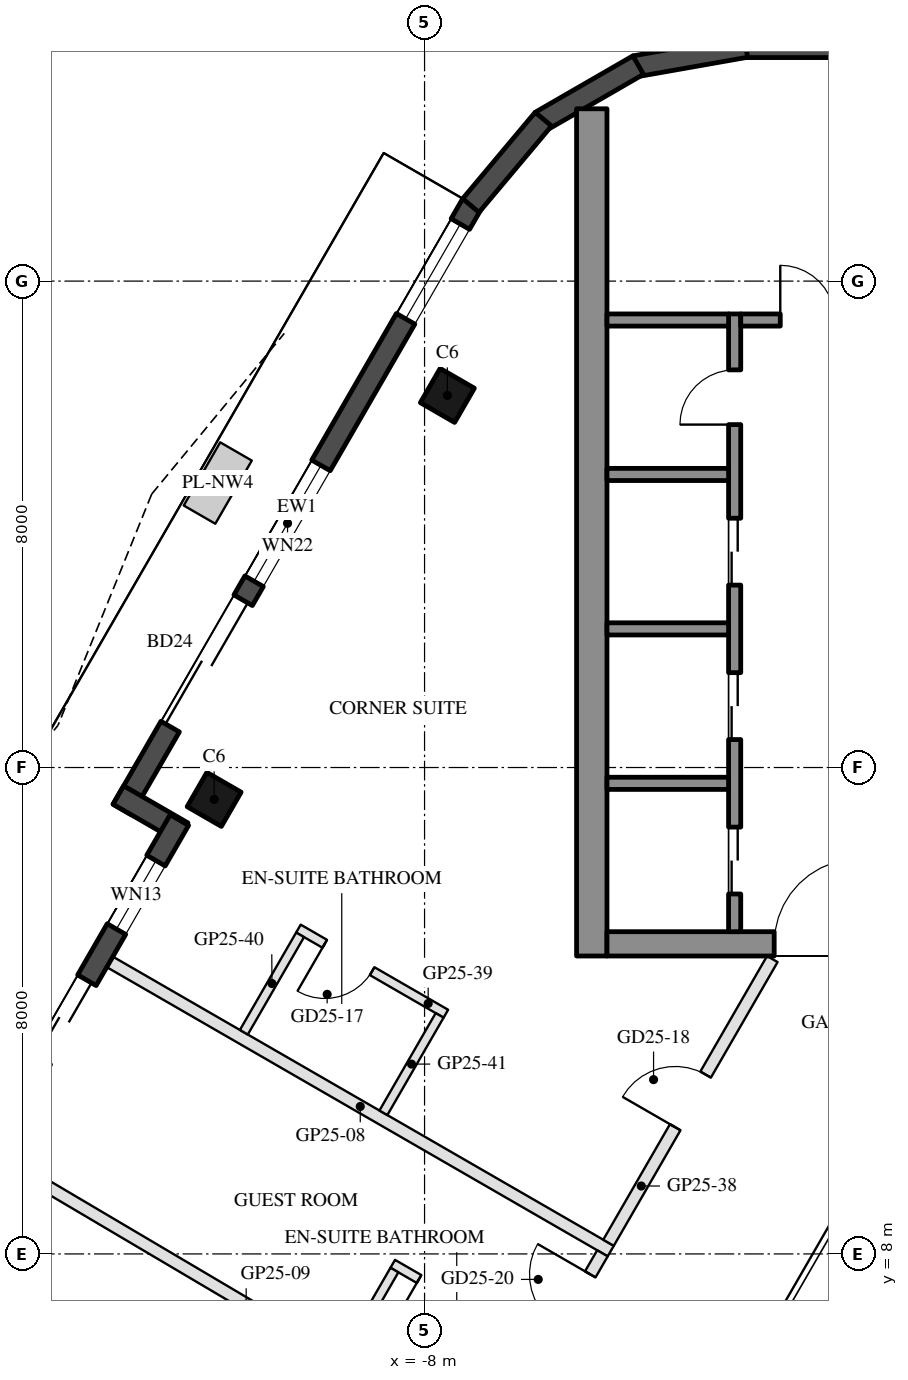
"""IFC4 building model, lengths in metres.
Left out: names, types, materials, properties, quantities, classifications, styles, units other than length and angle.
Written with IfcOpenShell. Run it as: python <this file> out.ifc"""

import sys

from ifc_helpers import new_model, si_unit, direction, frame, frame_2d, origin, origin_2d, place, context, subcontext, project, spatial, rectangle, hollow_rectangle, extrude, boolean, halfspace, element, fill, save


model = new_model("IFC4")
c1 = context("Model", 3, precision=1e-05, world=origin(), true_north=direction((0.0, 1.0)))
c2 = subcontext(c1, "Body", "Model", "MODEL_VIEW")
j1 = project(units=[si_unit("LENGTHUNIT", "METRE"), si_unit("PLANEANGLEUNIT", "RADIAN")], contexts=[c1])
p1 = place(None, origin())
s1 = spatial("IfcSite", under=j1, at=p1, CompositionType="ELEMENT")
p2 = place(p1, origin())
s2 = spatial("IfcBuilding", under=s1, at=p2, CompositionType="ELEMENT")
p3 = place(p2, frame((0.0, 0.0, 261.5)))
s3 = spatial("IfcBuildingStorey", under=s2, at=p3, CompositionType="ELEMENT", Elevation=261.5)
p4 = place(p3, frame((-7.625, 22.119, 0.0), z_axis=(0.0, 0.0, 1.0), x_axis=(0.5, 0.866025403784, 0.0)))
e1 = element("IfcColumn", 1, at=p4, inside=s3, PredefinedType="COLUMN", context=c2, shape_type="SweptSolid", body=[
    boolean("DIFFERENCE", extrude(hollow_rectangle(XDim=0.65, YDim=0.65, WallThickness=0.03, at=origin_2d()), origin(), (0.0, 0.0, 1.0), 3.7), halfspace(frame((0.0, 0.0, 3.653), z_axis=(0.0, 0.0, 1.0), x_axis=(1.0, 0.0, 0.0)), False)),
])
p5 = place(p3, frame((-11.461, 15.475, 0.0), z_axis=(0.0, 0.0, 1.0), x_axis=(0.5, 0.866025403784, 0.0)))
e2 = element("IfcColumn", 2, at=p5, inside=s3, PredefinedType="COLUMN", context=c2, shape_type="SweptSolid", body=[
    boolean("DIFFERENCE", extrude(hollow_rectangle(XDim=0.65, YDim=0.65, WallThickness=0.03, at=origin_2d()), origin(), (0.0, 0.0, 1.0), 3.7), halfspace(frame((0.0, 0.0, 3.66), z_axis=(0.0, 0.0, 1.0), x_axis=(1.0, 0.0, 0.0)), False)),
])
p6 = place(p3, frame((-7.221, 25.268, 0.0), z_axis=(0.0, 0.0, 1.0), x_axis=(-0.499999932627, -0.866025442683, 0.0)))
e3 = element("IfcWall", 3, at=p6, inside=s3, PredefinedType="SOLIDWALL", context=c2, shape_type="SweptSolid", body=[
    extrude(rectangle(XDim=11.5, YDim=0.35, at=frame_2d((5.75, 0.0))), origin(), (0.0, 0.0, 1.0), 3.55),
])
p7 = place(p6, frame((0.381, 0.0, 0.3)))
e4 = element("IfcOpeningElement", 4, at=p7, cuts=e3, PredefinedType="OPENING", context=c2, shape_type="SweptSolid", body=[
    extrude(rectangle(XDim=1.8, YDim=2.65, at=frame_2d((0.9, 1.325))), frame((0.0, 0.185, 0.0), z_axis=(0.0, -1.0, 0.0), x_axis=(1.0, 0.0, 0.0)), (0.0, 0.0, 1.0), 0.37),
])
p8 = place(p6, frame((7.525, 0.0, 0.0)))
e5 = element("IfcOpeningElement", 5, at=p8, cuts=e3, PredefinedType="OPENING", context=c2, shape_type="SweptSolid", body=[
    extrude(rectangle(XDim=2.4, YDim=2.4, at=frame_2d((1.2, 1.2))), frame((0.0, 0.185, 0.0), z_axis=(0.0, -1.0, 0.0), x_axis=(1.0, 0.0, 0.0)), (0.0, 0.0, 1.0), 0.37),
])
p9 = place(p6, frame((4.964, 0.0, 0.3)))
e6 = element("IfcOpeningElement", 6, at=p9, cuts=e3, PredefinedType="OPENING", context=c2, shape_type="SweptSolid", body=[
    extrude(rectangle(XDim=2.2, YDim=2.65, at=frame_2d((1.1, 1.325))), frame((0.0, 0.185, 0.0), z_axis=(0.0, -1.0, 0.0), x_axis=(1.0, 0.0, 0.0)), (0.0, 0.0, 1.0), 0.37),
])
p10 = place(p3, frame((-13.036, 15.548, 0.0), z_axis=(0.0, 0.0, 1.0), x_axis=(0.866005645448, -0.500034220881, 0.0)))
e7 = element("IfcWall", 7, at=p10, inside=s3, PredefinedType="SOLIDWALL", context=c2, shape_type="SweptSolid", body=[
    extrude(rectangle(XDim=1.22, YDim=0.35, at=frame_2d((0.61, 0.0))), origin(), (0.0, 0.0, 1.0), 3.55),
])
p11 = place(p3, frame((-12.032, 15.136, 0.0), z_axis=(0.0, 0.0, 1.0), x_axis=(-0.500005870429, -0.866022014464, 0.0)))
e8 = element("IfcWall", 8, at=p11, inside=s3, PredefinedType="SOLIDWALL", context=c2, shape_type="SweptSolid", body=[
    extrude(rectangle(XDim=6.512, YDim=0.35, at=frame_2d((3.256, 0.0))), origin(), (0.0, 0.0, 1.0), 3.55),
])
p12 = place(p11, frame((0.77, 0.0, 0.3)))
e9 = element("IfcOpeningElement", 9, at=p12, cuts=e8, PredefinedType="OPENING", context=c2, shape_type="SweptSolid", body=[
    extrude(rectangle(XDim=1.3, YDim=2.65, at=frame_2d((0.65, 1.325))), frame((0.0, 0.185, 0.0), z_axis=(0.0, -1.0, 0.0), x_axis=(1.0, 0.0, 0.0)), (0.0, 0.0, 1.0), 0.37),
])
p13 = place(p11, frame((3.042, 0.0, 0.0)))
e10 = element("IfcOpeningElement", 10, at=p13, cuts=e8, PredefinedType="OPENING", context=c2, shape_type="SweptSolid", body=[
    extrude(rectangle(XDim=1.5, YDim=2.4, at=frame_2d((0.75, 1.2))), frame((0.0, 0.185, 0.0), z_axis=(0.0, -1.0, 0.0), x_axis=(1.0, 0.0, 0.0)), (0.0, 0.0, 1.0), 0.37),
])
p14 = place(p11, frame((4.842, 0.0, 0.3)))
e11 = element("IfcOpeningElement", 11, at=p14, cuts=e8, PredefinedType="OPENING", context=c2, shape_type="SweptSolid", body=[
    extrude(rectangle(XDim=1.0, YDim=2.65, at=frame_2d((0.5, 1.325))), frame((0.0, 0.185, 0.0), z_axis=(0.0, -1.0, 0.0), x_axis=(1.0, 0.0, 0.0)), (0.0, 0.0, 1.0), 0.37),
])
p15 = place(p3, frame((2.747, 27.851, 0.0), z_axis=(0.0, 0.0, 1.0), x_axis=(-1.0, 0.0, 0.0)))
e12 = element("IfcWall", 12, at=p15, inside=s3, PredefinedType="SOLIDWALL", context=c2, shape_type="SweptSolid", body=[
    extrude(rectangle(XDim=5.495, YDim=0.35, at=frame_2d((2.747, 0.0))), origin(), (0.0, 0.0, 1.0), 3.55),
])
p16 = place(p3, frame((-2.717, 27.854, 0.0), z_axis=(0.0, 0.0, 1.0), x_axis=(-0.984795480386, -0.173717764815, 0.0)))
e13 = element("IfcWall", 13, at=p16, inside=s3, PredefinedType="SOLIDWALL", context=c2, shape_type="SweptSolid", body=[
    extrude(rectangle(XDim=1.855, YDim=0.35, at=frame_2d((0.928, 0.0))), origin(), (0.0, 0.0, 1.0), 3.55),
])
p17 = place(p3, frame((-4.487, 27.552, 0.0), z_axis=(0.0, 0.0, 1.0), x_axis=(-0.866080385203, -0.499904757295, 0.0)))
e14 = element("IfcWall", 14, at=p17, inside=s3, PredefinedType="SOLIDWALL", context=c2, shape_type="SweptSolid", body=[
    extrude(rectangle(XDim=1.855, YDim=0.35, at=frame_2d((0.927, 0.0))), origin(), (0.0, 0.0, 1.0), 3.55),
])
p18 = place(p3, frame((-6.046, 26.664, 0.0), z_axis=(0.0, 0.0, 1.0), x_axis=(-0.642756798522, -0.7660702957, 0.0)))
e15 = element("IfcWall", 15, at=p18, inside=s3, PredefinedType="SOLIDWALL", context=c2, shape_type="SweptSolid", body=[
    extrude(rectangle(XDim=1.855, YDim=0.35, at=frame_2d((0.928, 0.0))), origin(), (0.0, 0.0, 1.0), 3.55),
])
p19 = place(p3, frame((-5.25, 12.9, 0.0), z_axis=(0.0, 0.0, 1.0), x_axis=(0.0, 1.0, 0.0)))
e16 = element("IfcWall", 16, at=p19, inside=s3, PredefinedType="SHEAR", context=c2, shape_type="SweptSolid", body=[
    extrude(rectangle(XDim=13.934, YDim=0.5, at=frame_2d((6.967, 0.0))), origin(), (0.0, 0.0, 1.0), 3.5),
])
p20 = place(p3, frame((5.0, 13.1, 0.0), z_axis=(0.0, 0.0, 1.0), x_axis=(-1.0, 0.0, 0.0)))
e17 = element("IfcWall", 17, at=p20, inside=s3, PredefinedType="SHEAR", context=c2, shape_type="SweptSolid", body=[
    extrude(rectangle(XDim=10.0, YDim=0.4, at=frame_2d((5.0, 0.0))), origin(), (0.0, 0.0, 1.0), 3.5),
])
p21 = place(p20, frame((3.55, 0.0, 0.0)))
e18 = element("IfcOpeningElement", 18, at=p21, cuts=e17, PredefinedType="OPENING", context=c2, shape_type="SweptSolid", body=[
    extrude(rectangle(XDim=1.1, YDim=2.1, at=frame_2d((0.55, 1.05))), frame((0.0, 0.21, 0.0), z_axis=(0.0, -1.0, 0.0), x_axis=(1.0, 0.0, 0.0)), (0.0, 0.0, 1.0), 0.42),
])
p22 = place(p20, frame((5.85, 0.0, 0.0)))
e19 = element("IfcOpeningElement", 19, at=p22, cuts=e17, PredefinedType="OPENING", context=c2, shape_type="SweptSolid", body=[
    extrude(rectangle(XDim=1.4, YDim=2.1, at=frame_2d((0.7, 1.05))), frame((0.0, 0.21, 0.0), z_axis=(0.0, -1.0, 0.0), x_axis=(1.0, 0.0, 0.0)), (0.0, 0.0, 1.0), 0.42),
])
p23 = place(p3, frame((-2.9, 13.3, 0.0), z_axis=(0.0, 0.0, 1.0), x_axis=(0.0, 1.0, 0.0)))
e20 = element("IfcWall", 20, at=p23, inside=s3, PredefinedType="SHEAR", context=c2, shape_type="SweptSolid", body=[
    extrude(rectangle(XDim=10.16, YDim=0.2, at=frame_2d((5.08, 0.0))), origin(), (0.0, 0.0, 1.0), 3.5),
])
p24 = place(p23, frame((0.62, 0.0, 0.0)))
e21 = element("IfcOpeningElement", 21, at=p24, cuts=e20, PredefinedType="OPENING", context=c2, shape_type="SweptSolid", body=[
    extrude(rectangle(XDim=1.1, YDim=2.1, at=frame_2d((0.55, 1.05))), frame((0.0, 0.11, 0.0), z_axis=(0.0, -1.0, 0.0), x_axis=(1.0, 0.0, 0.0)), (0.0, 0.0, 1.0), 0.22),
])
p25 = place(p23, frame((3.16, 0.0, 0.0)))
e22 = element("IfcOpeningElement", 22, at=p25, cuts=e20, PredefinedType="OPENING", context=c2, shape_type="SweptSolid", body=[
    extrude(rectangle(XDim=1.1, YDim=2.1, at=frame_2d((0.55, 1.05))), frame((0.0, 0.11, 0.0), z_axis=(0.0, -1.0, 0.0), x_axis=(1.0, 0.0, 0.0)), (0.0, 0.0, 1.0), 0.22),
])
p26 = place(p23, frame((5.7, 0.0, 0.0)))
e23 = element("IfcOpeningElement", 23, at=p26, cuts=e20, PredefinedType="OPENING", context=c2, shape_type="SweptSolid", body=[
    extrude(rectangle(XDim=1.1, YDim=2.1, at=frame_2d((0.55, 1.05))), frame((0.0, 0.11, 0.0), z_axis=(0.0, -1.0, 0.0), x_axis=(1.0, 0.0, 0.0)), (0.0, 0.0, 1.0), 0.22),
])
p27 = place(p23, frame((8.34, 0.0, 0.0)))
e24 = element("IfcOpeningElement", 24, at=p27, cuts=e20, PredefinedType="OPENING", context=c2, shape_type="SweptSolid", body=[
    extrude(rectangle(XDim=0.9, YDim=2.1, at=frame_2d((0.45, 1.05))), frame((0.0, 0.11, 0.0), z_axis=(0.0, -1.0, 0.0), x_axis=(1.0, 0.0, 0.0)), (0.0, 0.0, 1.0), 0.22),
])
p28 = place(p3, frame((-0.4, 23.36, 0.0), z_axis=(0.0, 0.0, 1.0), x_axis=(-1.0, 0.0, 0.0)))
e25 = element("IfcWall", 25, at=p28, inside=s3, PredefinedType="SHEAR", context=c2, shape_type="SweptSolid", body=[
    extrude(rectangle(XDim=2.4, YDim=0.2, at=frame_2d((1.2, 0.0))), origin(), (0.0, 0.0, 1.0), 3.5),
])
p29 = place(p28, frame((0.85, 0.0, 0.0)))
e26 = element("IfcOpeningElement", 26, at=p29, cuts=e25, PredefinedType="OPENING", context=c2, shape_type="SweptSolid", body=[
    extrude(rectangle(XDim=0.9, YDim=2.1, at=frame_2d((0.45, 1.05))), frame((0.0, 0.11, 0.0), z_axis=(0.0, -1.0, 0.0), x_axis=(1.0, 0.0, 0.0)), (0.0, 0.0, 1.0), 0.22),
])
for number, where, z_axis, x_axis in (
    (27, (-3.0, 15.74, 0.0), (0.0, 0.0, 1.0), (-1.0, 0.0, 0.0)),
    (28, (-3.0, 18.28, 0.0), (0.0, 0.0, 1.0), (-1.0, 0.0, 0.0)),
    (29, (-3.0, 20.82, 0.0), (0.0, 0.0, 1.0), (-1.0, 0.0, 0.0)),
    (30, (-3.0, 23.36, 0.0), (0.0, 0.0, 1.0), (-1.0, 0.0, 0.0)),
):
    element("IfcWall", number, at=place(p3, frame(where, z_axis=z_axis, x_axis=x_axis)), inside=s3, PredefinedType="SHEAR", context=c2, shape_type="SweptSolid", body=[
        extrude(rectangle(XDim=2.0, YDim=0.2, at=frame_2d((1.0, 0.0))), origin(), (0.0, 0.0, 1.0), 3.5),
    ])
p30 = place(p3, frame((-13.177, 12.804, 0.0), z_axis=(0.0, 0.0, 1.0), x_axis=(0.866021901412, -0.500006066238, 0.0)))
e31 = element("IfcWall", 31, at=p30, inside=s3, PredefinedType="PARTITIONING", context=c2, shape_type="SweptSolid", body=[
    extrude(rectangle(XDim=9.513, YDim=0.2, at=frame_2d((4.757, 0.0))), origin(), (0.0, 0.0, 1.0), 3.1),
])
p31 = place(p3, frame((-15.029, 9.596, 0.0), z_axis=(0.0, 0.0, 1.0), x_axis=(0.860830464323, -0.508891846754, 0.0)))
e32 = element("IfcWall", 32, at=p31, inside=s3, PredefinedType="PARTITIONING", context=c2, shape_type="SweptSolid", body=[
    extrude(rectangle(XDim=9.513, YDim=0.2, at=frame_2d((4.757, 0.0))), origin(), (0.0, 0.0, 1.0), 3.1),
])
p32 = place(p3, frame((-4.975, 8.184, 0.0), z_axis=(0.0, 0.0, 1.0), x_axis=(0.499983925036, 0.86603468447, 0.0)))
e33 = element("IfcWall", 33, at=p32, inside=s3, PredefinedType="PARTITIONING", context=c2, shape_type="SweptSolid", body=[
    extrude(rectangle(XDim=5.388, YDim=0.2, at=frame_2d((2.694, 0.0))), origin(), (0.0, 0.0, 1.0), 3.0),
])
p33 = place(p32, frame((2.194, 0.0, 0.0)))
e34 = element("IfcOpeningElement", 34, at=p33, cuts=e33, PredefinedType="OPENING", context=c2, shape_type="SweptSolid", body=[
    extrude(rectangle(XDim=1.0, YDim=2.1, at=frame_2d((0.5, 1.05))), frame((0.0, 0.11, 0.0), z_axis=(0.0, -1.0, 0.0), x_axis=(1.0, 0.0, 0.0)), (0.0, 0.0, 1.0), 0.22),
])
p34 = place(p3, frame((-7.649, 11.951, 0.0), z_axis=(0.0, 0.0, 1.0), x_axis=(-0.865996816683, 0.500049511043, 0.0)))
e35 = element("IfcWall", 35, at=p34, inside=s3, PredefinedType="PARTITIONING", context=c2, shape_type="SweptSolid", body=[
    extrude(rectangle(XDim=2.8, YDim=0.15, at=frame_2d((1.4, 0.0))), origin(), (0.0, 0.0, 1.0), 3.55),
])
p35 = place(p34, frame((1.4, 0.0, 0.0)))
e36 = element("IfcOpeningElement", 36, at=p35, cuts=e35, PredefinedType="OPENING", context=c2, shape_type="SweptSolid", body=[
    extrude(rectangle(XDim=0.9, YDim=2.1, at=frame_2d((0.45, 1.05))), frame((0.0, 0.085, 0.0), z_axis=(0.0, -1.0, 0.0), x_axis=(1.0, 0.0, 0.0)), (0.0, 0.0, 1.0), 0.17),
])
for number, where, z_axis, x_axis in (
    (37, (-10.047, 13.248, 0.0), (0.0, 0.0, 1.0), (-0.5, -0.866, 0.0)),
    (38, (-7.752, 11.923, 0.0), (0.0, 0.0, 1.0), (-0.5, -0.866, 0.0)),
):
    element("IfcWall", number, at=place(p3, frame(where, z_axis=z_axis, x_axis=x_axis)), inside=s3, PredefinedType="PARTITIONING", context=c2, shape_type="SweptSolid", body=[
        extrude(rectangle(XDim=1.85, YDim=0.15, at=frame_2d((0.925, 0.0))), origin(), (0.0, 0.0, 1.0), 3.55),
    ])
p36 = place(p3, frame((-6.875, 4.892, 0.0), z_axis=(0.0, 0.0, 1.0), x_axis=(0.499945471869, 0.866056883327, 0.0)))
e39 = element("IfcWall", 39, at=p36, inside=s3, PredefinedType="PARTITIONING", context=c2, shape_type="SweptSolid", body=[
    extrude(rectangle(XDim=3.601, YDim=0.2, at=frame_2d((1.801, 0.0))), origin(), (0.0, 0.0, 1.0), 3.0),
])
p37 = place(p36, frame((2.201, 0.0, 0.0)))
e40 = element("IfcOpeningElement", 40, at=p37, cuts=e39, PredefinedType="OPENING", context=c2, shape_type="SweptSolid", body=[
    extrude(rectangle(XDim=1.0, YDim=2.1, at=frame_2d((0.5, 1.05))), frame((0.0, 0.11, 0.0), z_axis=(0.0, -1.0, 0.0), x_axis=(1.0, 0.0, 0.0)), (0.0, 0.0, 1.0), 0.22),
])
p38 = place(p3, frame((-6.098, 6.438, 0.0), z_axis=(0.0, 0.0, 1.0), x_axis=(-0.866018616679, 0.500011755427, 0.0)))
e41 = element("IfcWall", 41, at=p38, inside=s3, PredefinedType="PARTITIONING", context=c2, shape_type="SweptSolid", body=[
    extrude(rectangle(XDim=2.8, YDim=0.15, at=frame_2d((1.4, 0.0))), origin(), (0.0, 0.0, 1.0), 3.55),
])
p39 = place(p38, frame((1.4, 0.0, 0.0)))
e42 = element("IfcOpeningElement", 42, at=p39, cuts=e41, PredefinedType="OPENING", context=c2, shape_type="SweptSolid", body=[
    extrude(rectangle(XDim=0.9, YDim=2.1, at=frame_2d((0.45, 1.05))), frame((0.0, 0.085, 0.0), z_axis=(0.0, -1.0, 0.0), x_axis=(1.0, 0.0, 0.0)), (0.0, 0.0, 1.0), 0.17),
])
p40 = place(p3, frame((-8.496, 7.735, 0.0), z_axis=(0.0, 0.0, 1.0), x_axis=(-0.500021943523, -0.866012734315, 0.0)))
e43 = element("IfcWall", 43, at=p40, inside=s3, PredefinedType="PARTITIONING", context=c2, shape_type="SweptSolid", body=[
    extrude(rectangle(XDim=1.623, YDim=0.15, at=frame_2d((0.812, 0.0))), origin(), (0.0, 0.0, 1.0), 3.55),
])
p41 = place(p7, origin())
e44 = element("IfcWindow", 44, at=p41, inside=s3, PartitioningType="SINGLE_PANEL", PredefinedType="WINDOW", context=c2, shape_type="SweptSolid", body=[
    extrude(rectangle(XDim=1.8, YDim=2.65, at=frame_2d((0.9, 1.325))), frame((0.0, 0.03, 0.0), z_axis=(0.0, -1.0, 0.0), x_axis=(1.0, 0.0, 0.0)), (0.0, 0.0, 1.0), 0.06),
])
fill(e4, e44)
p42 = place(p8, frame((2.4, 0.0, 0.0), z_axis=(0.0, 0.0, 1.0), x_axis=(-1.0, 0.0, 0.0)))
e45 = element("IfcDoor", 45, at=p42, inside=s3, OperationType="SLIDING_TO_LEFT", PredefinedType="DOOR", context=c2, shape_type="SweptSolid", body=[
    extrude(rectangle(XDim=2.4, YDim=2.4, at=frame_2d((1.2, 1.2))), frame((0.0, 0.025, 0.0), z_axis=(0.0, -1.0, 0.0), x_axis=(1.0, 0.0, 0.0)), (0.0, 0.0, 1.0), 0.05),
])
fill(e5, e45)
p43 = place(p9, origin())
e46 = element("IfcWindow", 46, at=p43, inside=s3, PartitioningType="SINGLE_PANEL", PredefinedType="WINDOW", context=c2, shape_type="SweptSolid", body=[
    extrude(rectangle(XDim=2.2, YDim=2.65, at=frame_2d((1.1, 1.325))), frame((0.0, 0.03, 0.0), z_axis=(0.0, -1.0, 0.0), x_axis=(1.0, 0.0, 0.0)), (0.0, 0.0, 1.0), 0.06),
])
fill(e6, e46)
p44 = place(p12, origin())
e47 = element("IfcWindow", 47, at=p44, inside=s3, PartitioningType="SINGLE_PANEL", PredefinedType="WINDOW", context=c2, shape_type="SweptSolid", body=[
    extrude(rectangle(XDim=1.3, YDim=2.65, at=frame_2d((0.65, 1.325))), frame((0.0, 0.03, 0.0), z_axis=(0.0, -1.0, 0.0), x_axis=(1.0, 0.0, 0.0)), (0.0, 0.0, 1.0), 0.06),
])
fill(e9, e47)
p45 = place(p13, frame((1.5, 0.0, 0.0), z_axis=(0.0, 0.0, 1.0), x_axis=(-1.0, 0.0, 0.0)))
e48 = element("IfcDoor", 48, at=p45, inside=s3, OperationType="SLIDING_TO_LEFT", PredefinedType="DOOR", context=c2, shape_type="SweptSolid", body=[
    extrude(rectangle(XDim=1.5, YDim=2.4, at=frame_2d((0.75, 1.2))), frame((0.0, 0.025, 0.0), z_axis=(0.0, -1.0, 0.0), x_axis=(1.0, 0.0, 0.0)), (0.0, 0.0, 1.0), 0.05),
])
fill(e10, e48)
p46 = place(p24, origin())
e49 = element("IfcDoor", 49, at=p46, inside=s3, OperationType="DOUBLE_DOOR_SLIDING", PredefinedType="DOOR", context=c2, shape_type="SweptSolid", body=[
    extrude(rectangle(XDim=1.1, YDim=2.1, at=frame_2d((0.55, 1.05))), frame((0.0, 0.025, 0.0), z_axis=(0.0, -1.0, 0.0), x_axis=(1.0, 0.0, 0.0)), (0.0, 0.0, 1.0), 0.05),
])
fill(e21, e49)
p47 = place(p25, origin())
e50 = element("IfcDoor", 50, at=p47, inside=s3, OperationType="DOUBLE_DOOR_SLIDING", PredefinedType="DOOR", context=c2, shape_type="SweptSolid", body=[
    extrude(rectangle(XDim=1.1, YDim=2.1, at=frame_2d((0.55, 1.05))), frame((0.0, 0.025, 0.0), z_axis=(0.0, -1.0, 0.0), x_axis=(1.0, 0.0, 0.0)), (0.0, 0.0, 1.0), 0.05),
])
fill(e22, e50)
p48 = place(p26, origin())
e51 = element("IfcDoor", 51, at=p48, inside=s3, OperationType="DOUBLE_DOOR_SLIDING", PredefinedType="DOOR", context=c2, shape_type="SweptSolid", body=[
    extrude(rectangle(XDim=1.1, YDim=2.1, at=frame_2d((0.55, 1.05))), frame((0.0, 0.025, 0.0), z_axis=(0.0, -1.0, 0.0), x_axis=(1.0, 0.0, 0.0)), (0.0, 0.0, 1.0), 0.05),
])
fill(e23, e51)
p49 = place(p27, origin())
e52 = element("IfcDoor", 52, at=p49, inside=s3, OperationType="SINGLE_SWING_LEFT", PredefinedType="DOOR", context=c2, shape_type="SweptSolid", body=[
    extrude(rectangle(XDim=0.9, YDim=2.1, at=frame_2d((0.45, 1.05))), frame((0.0, 0.025, 0.0), z_axis=(0.0, -1.0, 0.0), x_axis=(1.0, 0.0, 0.0)), (0.0, 0.0, 1.0), 0.05),
])
fill(e24, e52)
p50 = place(p29, frame((0.9, 0.0, 0.0), z_axis=(0.0, 0.0, 1.0), x_axis=(-1.0, 0.0, 0.0)))
e53 = element("IfcDoor", 53, at=p50, inside=s3, OperationType="SINGLE_SWING_LEFT", PredefinedType="DOOR", context=c2, shape_type="SweptSolid", body=[
    extrude(rectangle(XDim=0.9, YDim=2.1, at=frame_2d((0.45, 1.05))), frame((0.0, 0.025, 0.0), z_axis=(0.0, -1.0, 0.0), x_axis=(1.0, 0.0, 0.0)), (0.0, 0.0, 1.0), 0.05),
])
fill(e26, e53)
p51 = place(p22, frame((1.4, 0.0, 0.0), z_axis=(0.0, 0.0, 1.0), x_axis=(-1.0, 0.0, 0.0)))
e54 = element("IfcDoor", 54, at=p51, inside=s3, OperationType="DOUBLE_DOOR_SINGLE_SWING", PredefinedType="DOOR", context=c2, shape_type="SweptSolid", body=[
    extrude(rectangle(XDim=1.4, YDim=2.1, at=frame_2d((0.7, 1.05))), frame((0.0, 0.025, 0.0), z_axis=(0.0, -1.0, 0.0), x_axis=(1.0, 0.0, 0.0)), (0.0, 0.0, 1.0), 0.05),
])
fill(e19, e54)
p52 = place(p35, origin())
e55 = element("IfcDoor", 55, at=p52, inside=s3, OperationType="SINGLE_SWING_RIGHT", PredefinedType="DOOR", context=c2, shape_type="SweptSolid", body=[
    extrude(rectangle(XDim=0.9, YDim=2.1, at=frame_2d((0.45, 1.05))), frame((0.0, 0.025, 0.0), z_axis=(0.0, -1.0, 0.0), x_axis=(1.0, 0.0, 0.0)), (0.0, 0.0, 1.0), 0.05),
])
fill(e36, e55)
p53 = place(p33, origin())
e56 = element("IfcDoor", 56, at=p53, inside=s3, OperationType="SINGLE_SWING_LEFT", PredefinedType="DOOR", context=c2, shape_type="SweptSolid", body=[
    extrude(rectangle(XDim=1.0, YDim=2.1, at=frame_2d((0.5, 1.05))), frame((0.0, 0.025, 0.0), z_axis=(0.0, -1.0, 0.0), x_axis=(1.0, 0.0, 0.0)), (0.0, 0.0, 1.0), 0.05),
])
fill(e34, e56)
p54 = place(p39, origin())
e57 = element("IfcDoor", 57, at=p54, inside=s3, OperationType="SINGLE_SWING_RIGHT", PredefinedType="DOOR", context=c2, shape_type="SweptSolid", body=[
    extrude(rectangle(XDim=0.9, YDim=2.1, at=frame_2d((0.45, 1.05))), frame((0.0, 0.025, 0.0), z_axis=(0.0, -1.0, 0.0), x_axis=(1.0, 0.0, 0.0)), (0.0, 0.0, 1.0), 0.05),
])
fill(e42, e57)
p55 = place(p37, origin())
e58 = element("IfcDoor", 58, at=p55, inside=s3, OperationType="SINGLE_SWING_RIGHT", PredefinedType="DOOR", context=c2, shape_type="SweptSolid", body=[
    extrude(rectangle(XDim=1.0, YDim=2.1, at=frame_2d((0.5, 1.05))), frame((0.0, 0.025, 0.0), z_axis=(0.0, -1.0, 0.0), x_axis=(1.0, 0.0, 0.0)), (0.0, 0.0, 1.0), 0.05),
])
fill(e40, e58)
save(model, sys.argv[1])
